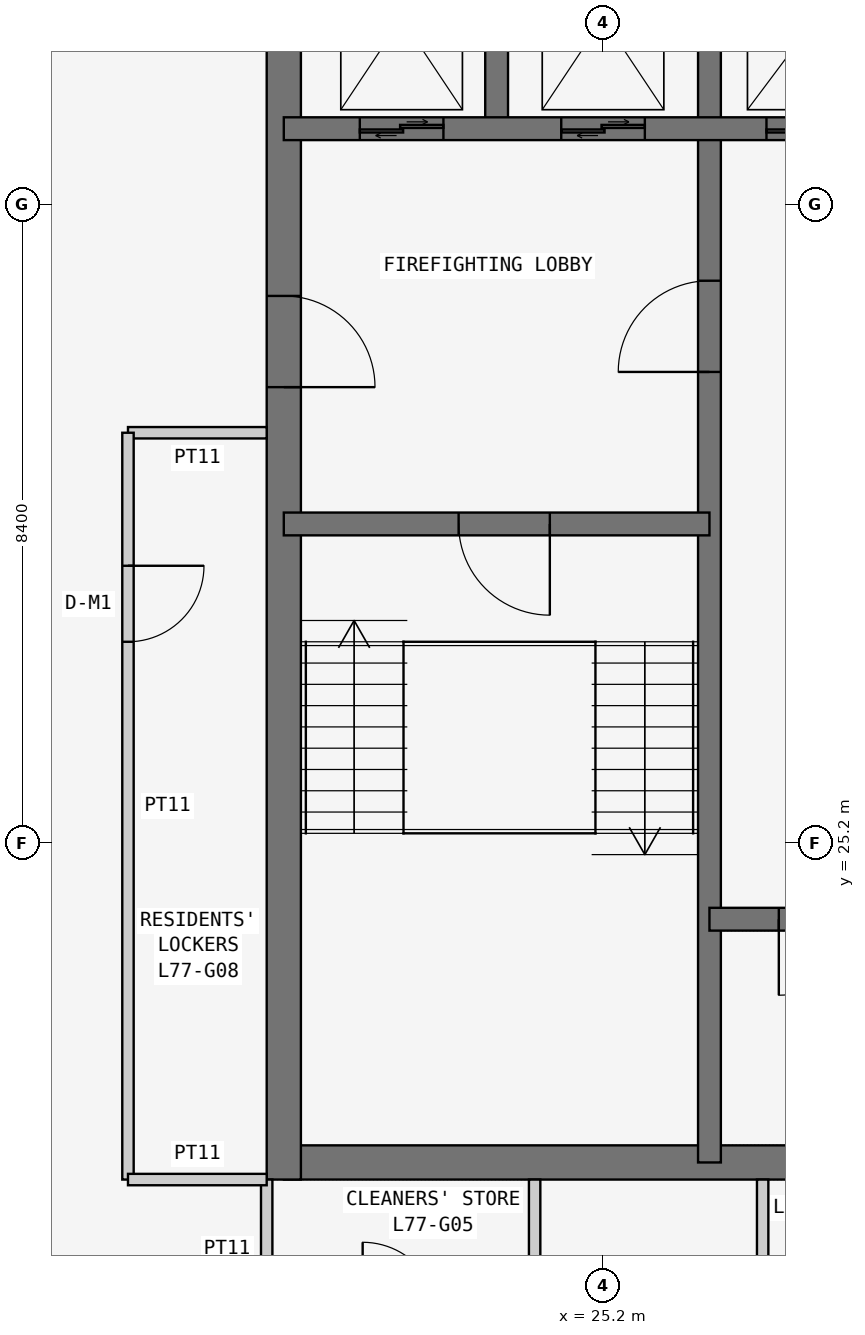
"""IFC4 building model, lengths in metres.
Left out: names, types, materials, properties, quantities, classifications, styles, units other than length and angle.
Written with IfcOpenShell. Run it as: python <this file> out.ifc"""

import sys

from ifc_helpers import new_model, si_unit, direction, frame, frame_2d, origin, place, context, subcontext, project, spatial, rectangle, extrude, element, fill, save


model = new_model("IFC4")
c1 = context("Model", 3, precision=1e-05, world=origin(), true_north=direction((0.0, 1.0)))
c2 = subcontext(c1, "Body", "Model", "MODEL_VIEW")
j1 = project(units=[si_unit("LENGTHUNIT", "METRE"), si_unit("PLANEANGLEUNIT", "RADIAN")], contexts=[c1])
p1 = place(None, origin())
s1 = spatial("IfcSite", under=j1, at=p1, CompositionType="ELEMENT")
p2 = place(p1, origin())
s2 = spatial("IfcBuilding", under=s1, at=p2, CompositionType="ELEMENT")
p3 = place(p2, frame((0.0, 0.0, 293.7)))
s3 = spatial("IfcBuildingStorey", under=s2, at=p3, CompositionType="ELEMENT", Elevation=293.7)
p4 = place(p3, frame((21.0, 21.0, 0.0), z_axis=(0.0, 0.0, 1.0), x_axis=(1.0, 0.0, 0.0)))
e1 = element("IfcWall", 1, at=p4, inside=s3, PredefinedType="SHEAR", context=c2, shape_type="SweptSolid", body=[
    extrude(rectangle(XDim=17.025, YDim=0.45, at=frame_2d((8.512, 0.0))), origin(), (0.0, 0.0, 1.0), 3.6),
])
p5 = place(p3, frame((21.0, 37.8, 0.0), z_axis=(0.0, 0.0, 1.0), x_axis=(0.0, -1.0, 0.0)))
e2 = element("IfcWall", 2, at=p5, inside=s3, PredefinedType="SHEAR", context=c2, shape_type="SweptSolid", body=[
    extrude(rectangle(XDim=17.025, YDim=0.45, at=frame_2d((8.513, 0.0))), origin(), (0.0, 0.0, 1.0), 3.6),
])
p6 = place(p5, frame((5.4, 0.0, 0.0)))
e3 = element("IfcOpeningElement", 3, at=p6, cuts=e2, PredefinedType="OPENING", context=c2, shape_type="SweptSolid", body=[
    extrude(rectangle(XDim=1.2, YDim=2.1, at=frame_2d((0.6, 1.05))), frame((0.0, 0.235, 0.0), z_axis=(0.0, -1.0, 0.0), x_axis=(1.0, 0.0, 0.0)), (0.0, 0.0, 1.0), 0.47),
])
p7 = place(p3, frame((26.6, 21.0, 0.0), z_axis=(0.0, 0.0, 1.0), x_axis=(0.0, 1.0, 0.0)))
e4 = element("IfcWall", 4, at=p7, inside=s3, PredefinedType="SHEAR", context=c2, shape_type="SweptSolid", body=[
    extrude(rectangle(XDim=16.8, YDim=0.3, at=frame_2d((8.4, 0.0))), origin(), (0.0, 0.0, 1.0), 3.6),
])
p8 = place(p7, frame((10.4, 0.0, 0.0)))
e5 = element("IfcOpeningElement", 5, at=p8, cuts=e4, PredefinedType="OPENING", context=c2, shape_type="SweptSolid", body=[
    extrude(rectangle(XDim=1.2, YDim=2.1, at=frame_2d((0.6, 1.05))), frame((0.0, 0.16, 0.0), z_axis=(0.0, -1.0, 0.0), x_axis=(1.0, 0.0, 0.0)), (0.0, 0.0, 1.0), 0.32),
])
p9 = place(p3, frame((21.0, 29.4, 0.0), z_axis=(0.0, 0.0, 1.0), x_axis=(1.0, 0.0, 0.0)))
e6 = element("IfcWall", 6, at=p9, inside=s3, PredefinedType="SHEAR", context=c2, shape_type="SweptSolid", body=[
    extrude(rectangle(XDim=5.6, YDim=0.3, at=frame_2d((2.8, 0.0))), origin(), (0.0, 0.0, 1.0), 3.6),
])
p10 = place(p9, frame((2.3, 0.0, 0.0)))
e7 = element("IfcOpeningElement", 7, at=p10, cuts=e6, PredefinedType="OPENING", context=c2, shape_type="SweptSolid", body=[
    extrude(rectangle(XDim=1.2, YDim=2.1, at=frame_2d((0.6, 1.05))), frame((0.0, 0.16, 0.0), z_axis=(0.0, -1.0, 0.0), x_axis=(1.0, 0.0, 0.0)), (0.0, 0.0, 1.0), 0.32),
])
p11 = place(p3, frame((21.0, 34.6, 0.0), z_axis=(0.0, 0.0, 1.0), x_axis=(1.0, 0.0, 0.0)))
e8 = element("IfcWall", 8, at=p11, inside=s3, PredefinedType="SHEAR", context=c2, shape_type="SweptSolid", body=[
    extrude(rectangle(XDim=11.2, YDim=0.3, at=frame_2d((5.6, 0.0))), origin(), (0.0, 0.0, 1.0), 3.6),
])
p12 = place(p11, frame((9.35, 0.0, 0.0)))
e9 = element("IfcOpeningElement", 9, at=p12, cuts=e8, PredefinedType="OPENING", context=c2, shape_type="SweptSolid", body=[
    extrude(rectangle(XDim=0.9, YDim=2.1, at=frame_2d((0.45, 1.05))), frame((0.0, 0.16, 0.0), z_axis=(0.0, -1.0, 0.0), x_axis=(1.0, 0.0, 0.0)), (0.0, 0.0, 1.0), 0.32),
])
p13 = place(p11, frame((1.0, 0.0, 0.0)))
e10 = element("IfcOpeningElement", 10, at=p13, cuts=e8, PredefinedType="OPENING", context=c2, shape_type="SweptSolid", body=[
    extrude(rectangle(XDim=1.1, YDim=2.1, at=frame_2d((0.55, 1.05))), frame((0.0, 0.16, 0.0), z_axis=(0.0, -1.0, 0.0), x_axis=(1.0, 0.0, 0.0)), (0.0, 0.0, 1.0), 0.32),
])
p14 = place(p11, frame((3.65, 0.0, 0.0)))
e11 = element("IfcOpeningElement", 11, at=p14, cuts=e8, PredefinedType="OPENING", context=c2, shape_type="SweptSolid", body=[
    extrude(rectangle(XDim=1.1, YDim=2.1, at=frame_2d((0.55, 1.05))), frame((0.0, 0.16, 0.0), z_axis=(0.0, -1.0, 0.0), x_axis=(1.0, 0.0, 0.0)), (0.0, 0.0, 1.0), 0.32),
])
p15 = place(p11, frame((6.35, 0.0, 0.0)))
e12 = element("IfcOpeningElement", 12, at=p15, cuts=e8, PredefinedType="OPENING", context=c2, shape_type="SweptSolid", body=[
    extrude(rectangle(XDim=1.3, YDim=2.1, at=frame_2d((0.65, 1.05))), frame((0.0, 0.16, 0.0), z_axis=(0.0, -1.0, 0.0), x_axis=(1.0, 0.0, 0.0)), (0.0, 0.0, 1.0), 0.32),
])
p16 = place(p3, frame((23.8, 34.6, 0.0), z_axis=(0.0, 0.0, 1.0), x_axis=(0.0, 1.0, 0.0)))
e13 = element("IfcWall", 13, at=p16, inside=s3, PredefinedType="SHEAR", context=c2, shape_type="SweptSolid", body=[
    extrude(rectangle(XDim=3.2, YDim=0.3, at=frame_2d((1.6, 0.0))), origin(), (0.0, 0.0, 1.0), 3.6),
])
p17 = place(p3, frame((26.6, 24.2, 0.0), z_axis=(0.0, 0.0, 1.0), x_axis=(1.0, 0.0, 0.0)))
e14 = element("IfcWall", 14, at=p17, inside=s3, PredefinedType="SHEAR", context=c2, shape_type="SweptSolid", body=[
    extrude(rectangle(XDim=11.2, YDim=0.3, at=frame_2d((5.6, 0.0))), origin(), (0.0, 0.0, 1.0), 3.6),
])
p18 = place(p17, frame((0.913, 0.0, 0.0)))
e15 = element("IfcOpeningElement", 15, at=p18, cuts=e14, PredefinedType="OPENING", context=c2, shape_type="SweptSolid", body=[
    extrude(rectangle(XDim=1.0, YDim=2.1, at=frame_2d((0.5, 1.05))), frame((0.0, 0.16, 0.0), z_axis=(0.0, -1.0, 0.0), x_axis=(1.0, 0.0, 0.0)), (0.0, 0.0, 1.0), 0.32),
])
p19 = place(p17, frame((3.7, 0.0, 0.0)))
e16 = element("IfcOpeningElement", 16, at=p19, cuts=e14, PredefinedType="OPENING", context=c2, shape_type="SweptSolid", body=[
    extrude(rectangle(XDim=1.0, YDim=2.1, at=frame_2d((0.5, 1.05))), frame((0.0, 0.16, 0.0), z_axis=(0.0, -1.0, 0.0), x_axis=(1.0, 0.0, 0.0)), (0.0, 0.0, 1.0), 0.32),
])
p20 = place(p17, frame((6.5, 0.0, 0.0)))
e17 = element("IfcOpeningElement", 17, at=p20, cuts=e14, PredefinedType="OPENING", context=c2, shape_type="SweptSolid", body=[
    extrude(rectangle(XDim=1.0, YDim=2.1, at=frame_2d((0.5, 1.05))), frame((0.0, 0.16, 0.0), z_axis=(0.0, -1.0, 0.0), x_axis=(1.0, 0.0, 0.0)), (0.0, 0.0, 1.0), 0.32),
])
p21 = place(p17, frame((9.1, 0.0, 0.0)))
e18 = element("IfcOpeningElement", 18, at=p21, cuts=e14, PredefinedType="OPENING", context=c2, shape_type="SweptSolid", body=[
    extrude(rectangle(XDim=1.1, YDim=2.1, at=frame_2d((0.55, 1.05))), frame((0.0, 0.16, 0.0), z_axis=(0.0, -1.0, 0.0), x_axis=(1.0, 0.0, 0.0)), (0.0, 0.0, 1.0), 0.32),
])
for number, where, z_axis, x_axis in (
    (19, (20.775, 20.775, 0.0), (0.0, 0.0, 1.0), (0.0, -1.0, 0.0)),
    (20, (24.3, 18.95, 0.0), (0.0, 0.0, 1.0), (0.0, 1.0, 0.0)),
):
    element("IfcWall", number, at=place(p3, frame(where, z_axis=z_axis, x_axis=x_axis)), inside=s3, PredefinedType="PARTITIONING", context=c2, shape_type="SweptSolid", body=[
        extrude(rectangle(XDim=1.825, YDim=0.15, at=frame_2d((0.913, 0.0))), origin(), (0.0, 0.0, 1.0), 3.45),
    ])
p22 = place(p3, frame((27.3, 20.775, 0.0), z_axis=(0.0, 0.0, 1.0), x_axis=(0.0, -1.0, 0.0)))
e21 = element("IfcWall", 21, at=p22, inside=s3, PredefinedType="PARTITIONING", context=c2, shape_type="SweptSolid", body=[
    extrude(rectangle(XDim=2.225, YDim=0.15, at=frame_2d((1.112, 0.0))), origin(), (0.0, 0.0, 1.0), 3.45),
])
p23 = place(p3, frame((20.775, 30.6, 0.0), z_axis=(0.0, 0.0, 1.0), x_axis=(-1.0, 0.0, 0.0)))
e22 = element("IfcWall", 22, at=p23, inside=s3, PredefinedType="PARTITIONING", context=c2, shape_type="SweptSolid", body=[
    extrude(rectangle(XDim=1.825, YDim=0.15, at=frame_2d((0.913, 0.0))), origin(), (0.0, 0.0, 1.0), 3.45),
])
p24 = place(p3, frame((18.95, 30.6, 0.0), z_axis=(0.0, 0.0, 1.0), x_axis=(0.0, -1.0, 0.0)))
e23 = element("IfcWall", 23, at=p24, inside=s3, PredefinedType="PARTITIONING", context=c2, shape_type="SweptSolid", body=[
    extrude(rectangle(XDim=9.825, YDim=0.15, at=frame_2d((4.913, 0.0))), origin(), (0.0, 0.0, 1.0), 3.45),
])
p25 = place(p24, frame((1.75, 0.0, 0.0)))
e24 = element("IfcOpeningElement", 24, at=p25, cuts=e23, PredefinedType="OPENING", context=c2, shape_type="SweptSolid", body=[
    extrude(rectangle(XDim=1.0, YDim=2.1, at=frame_2d((0.5, 1.05))), frame((0.0, 0.085, 0.0), z_axis=(0.0, -1.0, 0.0), x_axis=(1.0, 0.0, 0.0)), (0.0, 0.0, 1.0), 0.17),
])
p26 = place(p3, frame((18.95, 20.775, 0.0), z_axis=(0.0, 0.0, 1.0), x_axis=(1.0, 0.0, 0.0)))
e25 = element("IfcWall", 25, at=p26, inside=s3, PredefinedType="PARTITIONING", context=c2, shape_type="SweptSolid", body=[
    extrude(rectangle(XDim=1.825, YDim=0.15, at=frame_2d((0.913, 0.0))), origin(), (0.0, 0.0, 1.0), 3.45),
])
p27 = place(p25, origin())
e26 = element("IfcDoor", 26, at=p27, inside=s3, OperationType="SINGLE_SWING_LEFT", PredefinedType="DOOR", context=c2, shape_type="SweptSolid", body=[
    extrude(rectangle(XDim=1.0, YDim=2.1, at=frame_2d((0.5, 1.05))), frame((0.0, 0.025, 0.0), z_axis=(0.0, -1.0, 0.0), x_axis=(1.0, 0.0, 0.0)), (0.0, 0.0, 1.0), 0.05),
])
fill(e24, e26)
p28 = place(p6, origin())
e27 = element("IfcDoor", 27, at=p28, inside=s3, OperationType="SINGLE_SWING_RIGHT", PredefinedType="DOOR", context=c2, shape_type="SweptSolid", body=[
    extrude(rectangle(XDim=1.2, YDim=2.1, at=frame_2d((0.6, 1.05))), frame((0.0, 0.025, 0.0), z_axis=(0.0, -1.0, 0.0), x_axis=(1.0, 0.0, 0.0)), (0.0, 0.0, 1.0), 0.05),
])
fill(e3, e27)
p29 = place(p10, frame((1.2, 0.0, 0.0), z_axis=(0.0, 0.0, 1.0), x_axis=(-1.0, 0.0, 0.0)))
e28 = element("IfcDoor", 28, at=p29, inside=s3, OperationType="SINGLE_SWING_LEFT", PredefinedType="DOOR", context=c2, shape_type="SweptSolid", body=[
    extrude(rectangle(XDim=1.2, YDim=2.1, at=frame_2d((0.6, 1.05))), frame((0.0, 0.025, 0.0), z_axis=(0.0, -1.0, 0.0), x_axis=(1.0, 0.0, 0.0)), (0.0, 0.0, 1.0), 0.05),
])
fill(e7, e28)
p30 = place(p8, origin())
e29 = element("IfcDoor", 29, at=p30, inside=s3, OperationType="SINGLE_SWING_LEFT", PredefinedType="DOOR", context=c2, shape_type="SweptSolid", body=[
    extrude(rectangle(XDim=1.2, YDim=2.1, at=frame_2d((0.6, 1.05))), frame((0.0, 0.025, 0.0), z_axis=(0.0, -1.0, 0.0), x_axis=(1.0, 0.0, 0.0)), (0.0, 0.0, 1.0), 0.05),
])
fill(e5, e29)
p31 = place(p18, frame((1.0, 0.0, 0.0), z_axis=(0.0, 0.0, 1.0), x_axis=(-1.0, 0.0, 0.0)))
e30 = element("IfcDoor", 30, at=p31, inside=s3, OperationType="SINGLE_SWING_RIGHT", PredefinedType="DOOR", context=c2, shape_type="SweptSolid", body=[
    extrude(rectangle(XDim=1.0, YDim=2.1, at=frame_2d((0.5, 1.05))), frame((0.0, 0.025, 0.0), z_axis=(0.0, -1.0, 0.0), x_axis=(1.0, 0.0, 0.0)), (0.0, 0.0, 1.0), 0.05),
])
fill(e15, e30)
p32 = place(p13, origin())
e31 = element("IfcDoor", 31, at=p32, inside=s3, OperationType="DOUBLE_DOOR_SLIDING", PredefinedType="DOOR", context=c2, shape_type="SweptSolid", body=[
    extrude(rectangle(XDim=1.1, YDim=2.1, at=frame_2d((0.55, 1.05))), frame((0.0, 0.025, 0.0), z_axis=(0.0, -1.0, 0.0), x_axis=(1.0, 0.0, 0.0)), (0.0, 0.0, 1.0), 0.05),
])
fill(e10, e31)
p33 = place(p14, origin())
e32 = element("IfcDoor", 32, at=p33, inside=s3, OperationType="DOUBLE_DOOR_SLIDING", PredefinedType="DOOR", context=c2, shape_type="SweptSolid", body=[
    extrude(rectangle(XDim=1.1, YDim=2.1, at=frame_2d((0.55, 1.05))), frame((0.0, 0.025, 0.0), z_axis=(0.0, -1.0, 0.0), x_axis=(1.0, 0.0, 0.0)), (0.0, 0.0, 1.0), 0.05),
])
fill(e11, e32)
p34 = place(p15, origin())
e33 = element("IfcDoor", 33, at=p34, inside=s3, OperationType="DOUBLE_DOOR_SLIDING", PredefinedType="DOOR", context=c2, shape_type="SweptSolid", body=[
    extrude(rectangle(XDim=1.3, YDim=2.1, at=frame_2d((0.65, 1.05))), frame((0.0, 0.025, 0.0), z_axis=(0.0, -1.0, 0.0), x_axis=(1.0, 0.0, 0.0)), (0.0, 0.0, 1.0), 0.05),
])
fill(e12, e33)
save(model, sys.argv[1])
